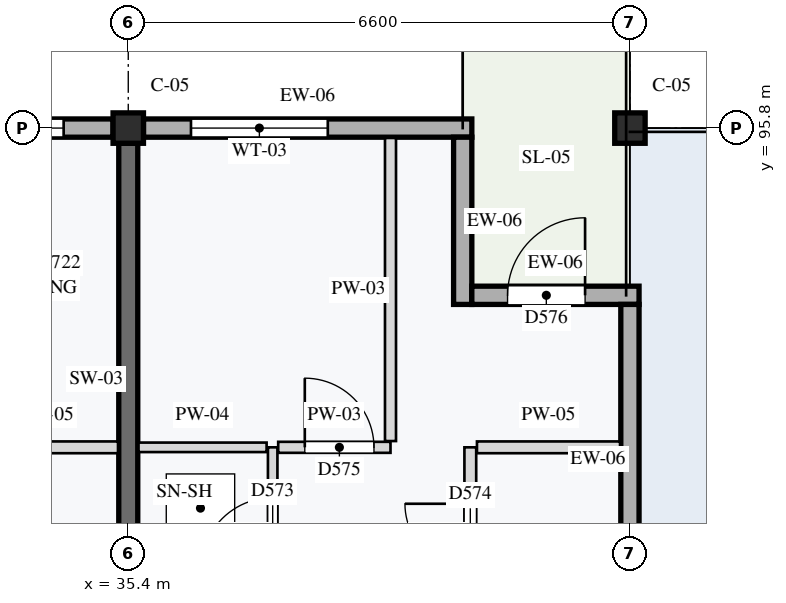
"""IFC4 building model, lengths in metres.
Left out: names, types, materials, properties, quantities, classifications, styles, units other than length and angle.
Written with IfcOpenShell. Run it as: python <this file> out.ifc"""

import sys

from ifc_helpers import new_model, si_unit, direction, frame, frame_2d, origin, origin_2d, place, context, subcontext, project, spatial, rectangle, extrude, element, fill, save


model = new_model("IFC4")
c1 = context("Model", 3, precision=1e-05, world=origin(), true_north=direction((0.0, 1.0)))
c2 = subcontext(c1, "Body", "Model", "MODEL_VIEW")
j1 = project(units=[si_unit("LENGTHUNIT", "METRE"), si_unit("PLANEANGLEUNIT", "RADIAN")], contexts=[c1])
p1 = place(None, origin())
s1 = spatial("IfcSite", under=j1, at=p1, CompositionType="ELEMENT")
p2 = place(p1, origin())
s2 = spatial("IfcBuilding", under=s1, at=p2, CompositionType="ELEMENT")
p3 = place(p2, frame((0.0, 0.0, 56.4)))
s3 = spatial("IfcBuildingStorey", under=s2, at=p3, CompositionType="ELEMENT", Elevation=56.4)
for number, where, z_axis, x_axis in (
    (1, (35.4, 95.8, 0.0), (0.0, 0.0, 1.0), (1.0, 0.0, 0.0)),
    (2, (42.0, 95.8, 0.0), (0.0, 0.0, 1.0), (1.0, 0.0, 0.0)),
):
    element("IfcColumn", number, at=place(p3, frame(where, z_axis=z_axis, x_axis=x_axis)), inside=s3, PredefinedType="COLUMN", context=c2, shape_type="SweptSolid", body=[
        extrude(rectangle(XDim=0.4, YDim=0.4, at=origin_2d()), origin(), (0.0, 0.0, 1.0), 3.2),
    ])
p4 = place(p3, frame((35.4, 89.4, 0.0), z_axis=(0.0, 0.0, 1.0), x_axis=(0.0, 1.0, 0.0)))
e3 = element("IfcWall", 3, at=p4, inside=s3, PredefinedType="SHEAR", context=c2, shape_type="SweptSolid", body=[
    extrude(rectangle(XDim=6.2, YDim=0.25, at=frame_2d((3.1, 0.0))), origin(), (0.0, 0.0, 1.0), 2.93),
])
p5 = place(p3, frame((29.0, 95.8, 0.0), z_axis=(0.0, 0.0, 1.0), x_axis=(1.0, 0.0, 0.0)))
e4 = element("IfcWall", 4, at=p5, inside=s3, PredefinedType="STANDARD", context=c2, shape_type="SweptSolid", body=[
    extrude(rectangle(XDim=6.2, YDim=0.24, at=frame_2d((3.1, 0.0))), origin(), (0.0, 0.0, 1.0), 2.65),
])
p6 = place(p5, frame((0.75, 0.0, 0.85)))
e5 = element("IfcOpeningElement", 5, at=p6, cuts=e4, PredefinedType="OPENING", context=c2, shape_type="SweptSolid", body=[
    extrude(rectangle(XDim=1.2, YDim=1.35, at=frame_2d((0.6, 0.675))), frame((0.0, 0.13, 0.0), z_axis=(0.0, -1.0, 0.0), x_axis=(1.0, 0.0, 0.0)), (0.0, 0.0, 1.0), 0.26),
])
p7 = place(p5, frame((3.45, 0.0, 0.85)))
e6 = element("IfcOpeningElement", 6, at=p7, cuts=e4, PredefinedType="OPENING", context=c2, shape_type="SweptSolid", body=[
    extrude(rectangle(XDim=2.1, YDim=1.55, at=frame_2d((1.05, 0.775))), frame((0.0, 0.13, 0.0), z_axis=(0.0, -1.0, 0.0), x_axis=(1.0, 0.0, 0.0)), (0.0, 0.0, 1.0), 0.26),
])
p8 = place(p3, frame((35.6, 95.8, 0.0), z_axis=(0.0, 0.0, 1.0), x_axis=(1.0, 0.0, 0.0)))
e7 = element("IfcWall", 7, at=p8, inside=s3, PredefinedType="STANDARD", context=c2, shape_type="SweptSolid", body=[
    extrude(rectangle(XDim=4.32, YDim=0.24, at=frame_2d((2.16, 0.0))), origin(), (0.0, 0.0, 1.0), 2.65),
])
p9 = place(p8, frame((0.625, 0.0, 0.85)))
e8 = element("IfcOpeningElement", 8, at=p9, cuts=e7, PredefinedType="OPENING", context=c2, shape_type="SweptSolid", body=[
    extrude(rectangle(XDim=1.8, YDim=1.35, at=frame_2d((0.9, 0.675))), frame((0.0, 0.13, 0.0), z_axis=(0.0, -1.0, 0.0), x_axis=(1.0, 0.0, 0.0)), (0.0, 0.0, 1.0), 0.26),
])
p10 = place(p3, frame((39.8, 95.68, 0.0), z_axis=(0.0, 0.0, 1.0), x_axis=(0.0, -1.0, 0.0)))
e9 = element("IfcWall", 9, at=p10, inside=s3, PredefinedType="STANDARD", context=c2, shape_type="SweptSolid", body=[
    extrude(rectangle(XDim=2.2, YDim=0.24, at=frame_2d((1.1, 0.0))), origin(), (0.0, 0.0, 1.0), 2.93),
])
p11 = place(p3, frame((39.92, 93.6, 0.0), z_axis=(0.0, 0.0, 1.0), x_axis=(1.0, 0.0, 0.0)))
e10 = element("IfcWall", 10, at=p11, inside=s3, PredefinedType="STANDARD", context=c2, shape_type="SweptSolid", body=[
    extrude(rectangle(XDim=2.2, YDim=0.24, at=frame_2d((1.1, 0.0))), origin(), (0.0, 0.0, 1.0), 2.93),
])
p12 = place(p11, frame((0.47, 0.0, 0.0)))
e11 = element("IfcOpeningElement", 11, at=p12, cuts=e10, PredefinedType="OPENING", context=c2, shape_type="SweptSolid", body=[
    extrude(rectangle(XDim=1.02, YDim=2.16, at=frame_2d((0.51, 1.08))), frame((0.0, 0.13, 0.0), z_axis=(0.0, -1.0, 0.0), x_axis=(1.0, 0.0, 0.0)), (0.0, 0.0, 1.0), 0.26),
])
p13 = place(p3, frame((42.0, 89.4, 0.0), z_axis=(0.0, 0.0, 1.0), x_axis=(0.0, 1.0, 0.0)))
e12 = element("IfcWall", 12, at=p13, inside=s3, PredefinedType="STANDARD", context=c2, shape_type="SweptSolid", body=[
    extrude(rectangle(XDim=4.08, YDim=0.24, at=frame_2d((2.04, 0.0))), origin(), (0.0, 0.0, 1.0), 2.65),
])
p14 = place(p3, frame((33.387, 91.6, 0.0), z_axis=(0.0, 0.0, 1.0), x_axis=(1.0, 0.0, 0.0)))
e13 = element("IfcWall", 13, at=p14, inside=s3, PredefinedType="PARTITIONING", context=c2, shape_type="SweptSolid", body=[
    extrude(rectangle(XDim=1.877, YDim=0.155, at=frame_2d((0.939, 0.0))), origin(), (0.0, 0.0, 1.0), 2.93),
])
p15 = place(p3, frame((37.3, 89.298, 0.0), z_axis=(0.0, 0.0, 1.0), x_axis=(0.0, 1.0, 0.0)))
e14 = element("IfcWall", 14, at=p15, inside=s3, PredefinedType="PARTITIONING", context=c2, shape_type="SweptSolid", body=[
    extrude(rectangle(XDim=2.302, YDim=0.125, at=frame_2d((1.151, 0.0))), origin(), (0.0, 0.0, 1.0), 2.93),
])
p16 = place(p15, frame((0.7, 0.0, 0.0)))
e15 = element("IfcOpeningElement", 15, at=p16, cuts=e14, PredefinedType="OPENING", context=c2, shape_type="SweptSolid", body=[
    extrude(rectangle(XDim=0.94, YDim=2.08, at=frame_2d((0.47, 1.04))), frame((0.0, 0.073, 0.0), z_axis=(0.0, -1.0, 0.0), x_axis=(1.0, 0.0, 0.0)), (0.0, 0.0, 1.0), 0.145),
])
p17 = place(p3, frame((35.535, 91.6, 0.0), z_axis=(0.0, 0.0, 1.0), x_axis=(1.0, 0.0, 0.0)))
e16 = element("IfcWall", 16, at=p17, inside=s3, PredefinedType="PARTITIONING", context=c2, shape_type="SweptSolid", body=[
    extrude(rectangle(XDim=1.685, YDim=0.125, at=frame_2d((0.843, 0.0))), origin(), (0.0, 0.0, 1.0), 2.93),
])
p18 = place(p3, frame((39.9, 89.298, 0.0), z_axis=(0.0, 0.0, 1.0), x_axis=(0.0, 1.0, 0.0)))
e17 = element("IfcWall", 17, at=p18, inside=s3, PredefinedType="PARTITIONING", context=c2, shape_type="SweptSolid", body=[
    extrude(rectangle(XDim=2.302, YDim=0.155, at=frame_2d((1.151, 0.0))), origin(), (0.0, 0.0, 1.0), 2.93),
])
p19 = place(p18, frame((0.7, 0.0, 0.0)))
e18 = element("IfcOpeningElement", 18, at=p19, cuts=e17, PredefinedType="OPENING", context=c2, shape_type="SweptSolid", body=[
    extrude(rectangle(XDim=0.86, YDim=2.12, at=frame_2d((0.43, 1.06))), frame((0.0, 0.087, 0.0), z_axis=(0.0, -1.0, 0.0), x_axis=(1.0, 0.0, 0.0)), (0.0, 0.0, 1.0), 0.175),
])
p20 = place(p3, frame((39.988, 91.6, 0.0), z_axis=(0.0, 0.0, 1.0), x_axis=(1.0, 0.0, 0.0)))
e19 = element("IfcWall", 19, at=p20, inside=s3, PredefinedType="PARTITIONING", context=c2, shape_type="SweptSolid", body=[
    extrude(rectangle(XDim=1.883, YDim=0.155, at=frame_2d((0.941, 0.0))), origin(), (0.0, 0.0, 1.0), 2.93),
])
p21 = place(p3, frame((37.373, 91.6, 0.0), z_axis=(0.0, 0.0, 1.0), x_axis=(1.0, 0.0, 0.0)))
e20 = element("IfcWall", 20, at=p21, inside=s3, PredefinedType="PARTITIONING", context=c2, shape_type="SweptSolid", body=[
    extrude(rectangle(XDim=1.478, YDim=0.145, at=frame_2d((0.739, 0.0))), origin(), (0.0, 0.0, 1.0), 2.93),
])
p22 = place(p21, frame((0.35, 0.0, 0.0)))
e21 = element("IfcOpeningElement", 21, at=p22, cuts=e20, PredefinedType="OPENING", context=c2, shape_type="SweptSolid", body=[
    extrude(rectangle(XDim=0.91, YDim=2.14, at=frame_2d((0.455, 1.07))), frame((0.0, 0.083, 0.0), z_axis=(0.0, -1.0, 0.0), x_axis=(1.0, 0.0, 0.0)), (0.0, 0.0, 1.0), 0.165),
])
p23 = place(p3, frame((38.85, 91.683, 0.0), z_axis=(0.0, 0.0, 1.0), x_axis=(0.0, 1.0, 0.0)))
e22 = element("IfcWall", 22, at=p23, inside=s3, PredefinedType="PARTITIONING", context=c2, shape_type="SweptSolid", body=[
    extrude(rectangle(XDim=3.987, YDim=0.145, at=frame_2d((1.994, 0.0))), origin(), (0.0, 0.0, 1.0), 2.93),
])
p24 = place(p7, origin())
e23 = element("IfcWindow", 23, at=p24, inside=s3, PartitioningType="SINGLE_PANEL", PredefinedType="WINDOW", context=c2, shape_type="SweptSolid", body=[
    extrude(rectangle(XDim=2.1, YDim=1.55, at=frame_2d((1.05, 0.775))), frame((0.0, 0.03, 0.0), z_axis=(0.0, -1.0, 0.0), x_axis=(1.0, 0.0, 0.0)), (0.0, 0.0, 1.0), 0.06),
])
fill(e6, e23)
p25 = place(p9, origin())
e24 = element("IfcWindow", 24, at=p25, inside=s3, PartitioningType="SINGLE_PANEL", PredefinedType="WINDOW", context=c2, shape_type="SweptSolid", body=[
    extrude(rectangle(XDim=1.8, YDim=1.35, at=frame_2d((0.9, 0.675))), frame((0.0, 0.03, 0.0), z_axis=(0.0, -1.0, 0.0), x_axis=(1.0, 0.0, 0.0)), (0.0, 0.0, 1.0), 0.06),
])
fill(e8, e24)
p26 = place(p12, origin())
e25 = element("IfcDoor", 25, at=p26, inside=s3, OperationType="SINGLE_SWING_RIGHT", PredefinedType="DOOR", context=c2, shape_type="SweptSolid", body=[
    extrude(rectangle(XDim=1.02, YDim=2.16, at=frame_2d((0.51, 1.08))), frame((0.0, 0.025, 0.0), z_axis=(0.0, -1.0, 0.0), x_axis=(1.0, 0.0, 0.0)), (0.0, 0.0, 1.0), 0.05),
])
fill(e11, e25)
p27 = place(p16, origin())
e26 = element("IfcDoor", 26, at=p27, inside=s3, OperationType="SINGLE_SWING_LEFT", PredefinedType="DOOR", context=c2, shape_type="SweptSolid", body=[
    extrude(rectangle(XDim=0.94, YDim=2.08, at=frame_2d((0.47, 1.04))), frame((0.0, 0.025, 0.0), z_axis=(0.0, -1.0, 0.0), x_axis=(1.0, 0.0, 0.0)), (0.0, 0.0, 1.0), 0.05),
])
fill(e15, e26)
p28 = place(p19, origin())
e27 = element("IfcDoor", 27, at=p28, inside=s3, OperationType="SINGLE_SWING_RIGHT", PredefinedType="DOOR", context=c2, shape_type="SweptSolid", body=[
    extrude(rectangle(XDim=0.86, YDim=2.12, at=frame_2d((0.43, 1.06))), frame((0.0, 0.025, 0.0), z_axis=(0.0, -1.0, 0.0), x_axis=(1.0, 0.0, 0.0)), (0.0, 0.0, 1.0), 0.05),
])
fill(e18, e27)
p29 = place(p22, origin())
e28 = element("IfcDoor", 28, at=p29, inside=s3, OperationType="SINGLE_SWING_LEFT", PredefinedType="DOOR", context=c2, shape_type="SweptSolid", body=[
    extrude(rectangle(XDim=0.91, YDim=2.14, at=frame_2d((0.455, 1.07))), frame((0.0, 0.025, 0.0), z_axis=(0.0, -1.0, 0.0), x_axis=(1.0, 0.0, 0.0)), (0.0, 0.0, 1.0), 0.05),
])
fill(e21, e28)
save(model, sys.argv[1])
